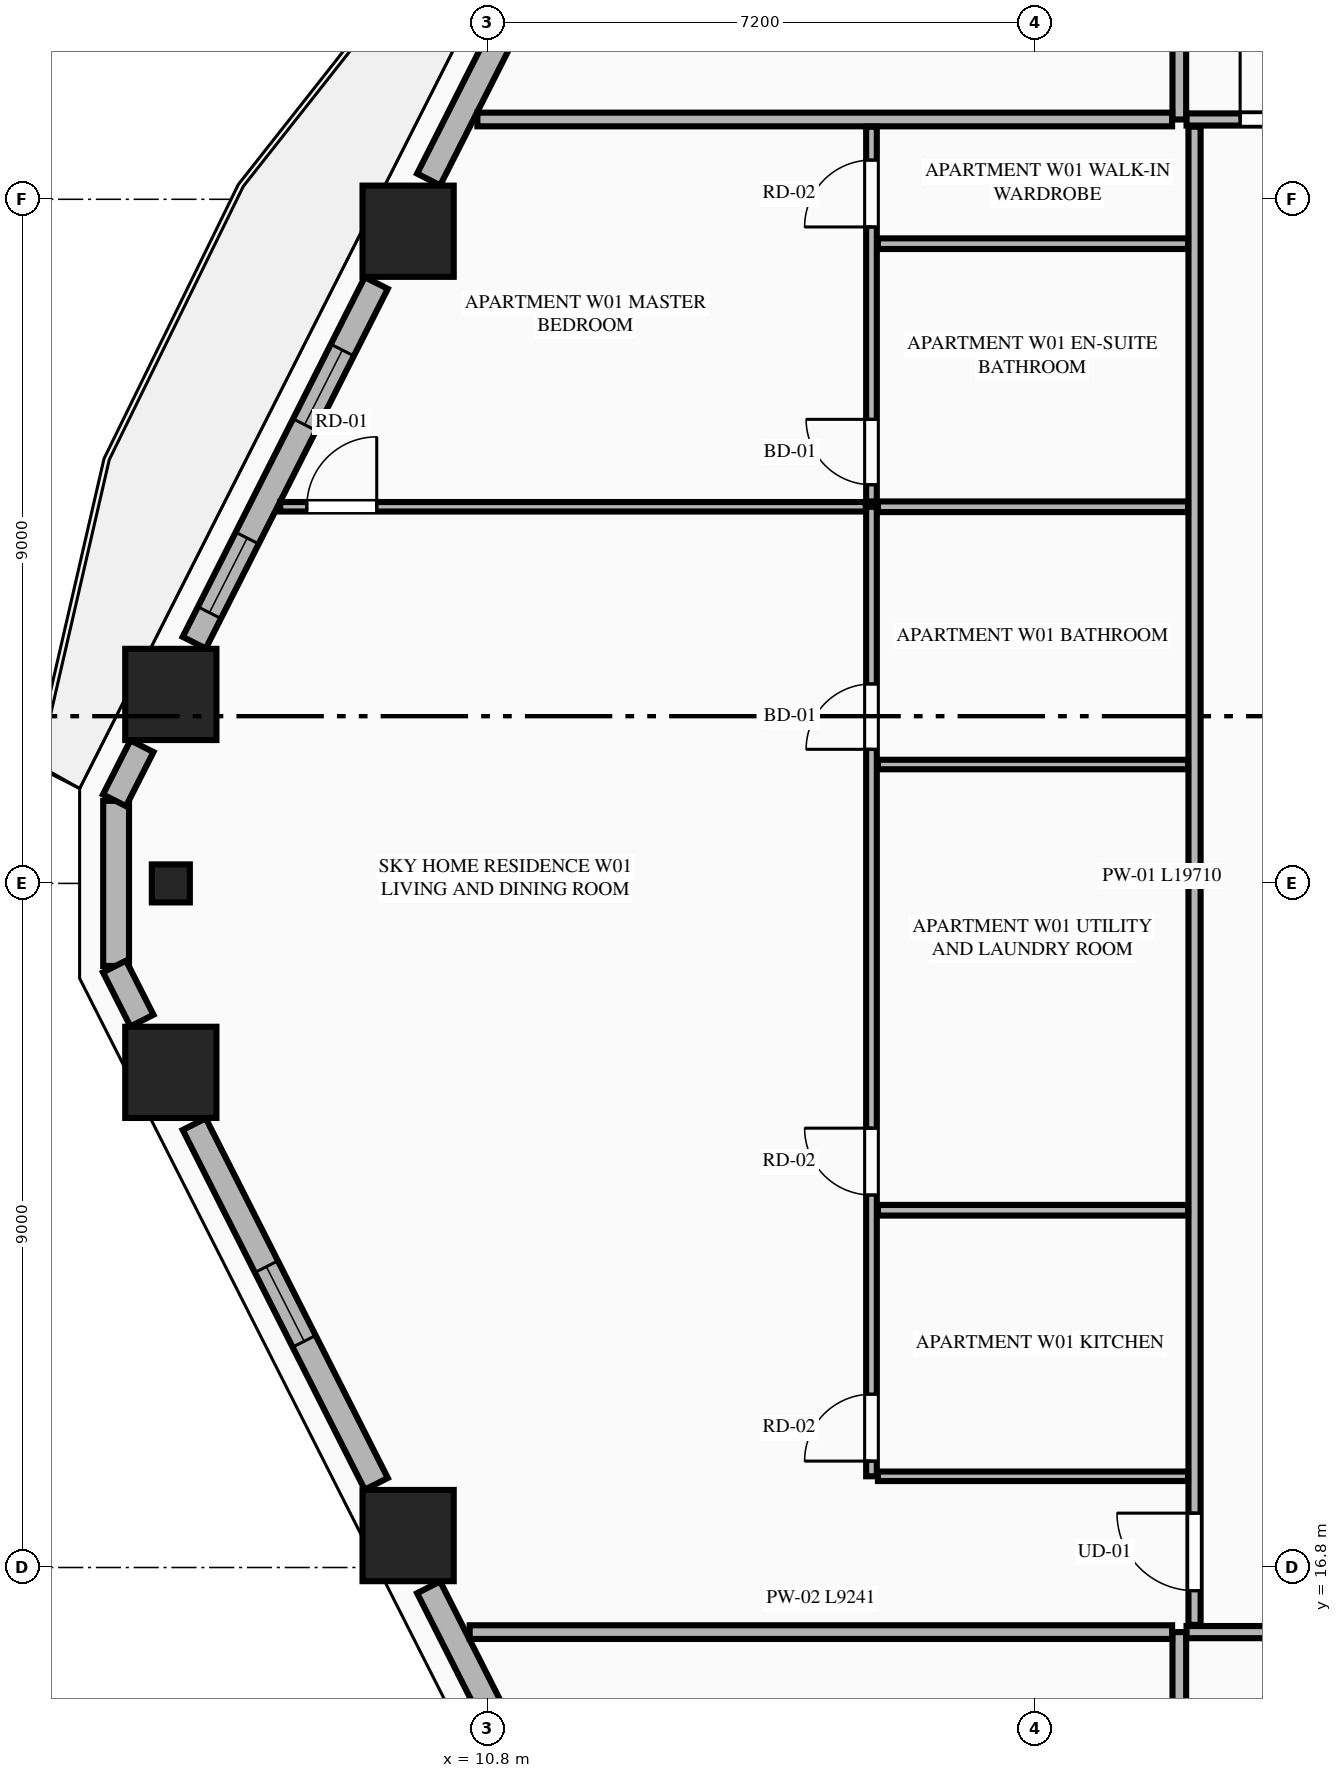
"""IFC4 building model, lengths in metres.
Left out: names, types, materials, properties, quantities, classifications, styles, units other than length and angle.
Written with IfcOpenShell. Run it as: python <this file> out.ifc"""

import sys

from ifc_helpers import new_model, si_unit, direction, frame, frame_2d, origin, origin_2d, place, context, subcontext, project, spatial, rectangle, extrude, element, fill, save


model = new_model("IFC4")
c1 = context("Model", 3, precision=1e-05, world=origin(), true_north=direction((0.0, 1.0)))
c2 = subcontext(c1, "Body", "Model", "MODEL_VIEW")
j1 = project(units=[si_unit("LENGTHUNIT", "METRE"), si_unit("PLANEANGLEUNIT", "RADIAN")], contexts=[c1])
p1 = place(None, origin())
s1 = spatial("IfcSite", under=j1, at=p1, CompositionType="ELEMENT")
p2 = place(p1, origin())
s2 = spatial("IfcBuilding", under=s1, at=p2, CompositionType="ELEMENT")
p3 = place(p2, frame((0.0, 0.0, 49.75)))
s3 = spatial("IfcBuildingStorey", under=s2, at=p3, CompositionType="ELEMENT", Elevation=49.75)
for number, where, z_axis, x_axis in (
    (1, (9.754, 34.38, 0.0), (0.0, 0.0, 1.0), (1.0, 0.0, 0.0)),
    (2, (6.632, 28.286, 0.0), (0.0, 0.0, 1.0), (1.0, 0.0, 0.0)),
    (3, (6.632, 23.314, 0.0), (0.0, 0.0, 1.0), (1.0, 0.0, 0.0)),
    (4, (9.754, 17.22, 0.0), (0.0, 0.0, 1.0), (1.0, 0.0, 0.0)),
):
    element("IfcColumn", number, at=place(p3, frame(where, z_axis=z_axis, x_axis=x_axis)), inside=s3, PredefinedType="COLUMN", context=c2, shape_type="SweptSolid", body=[
        extrude(rectangle(XDim=1.2, YDim=1.2, at=origin_2d()), origin(), (0.0, 0.0, 1.0), 3.55),
    ])
p4 = place(p3, frame((6.632, 25.8, 0.0), z_axis=(0.0, 0.0, 1.0), x_axis=(0.0, -1.0, 0.0)))
e5 = element("IfcColumn", 5, at=p4, inside=s3, PredefinedType="PILASTER", context=c2, shape_type="SweptSolid", body=[
    extrude(rectangle(XDim=0.5, YDim=0.35, at=origin_2d()), origin(), (0.0, 0.0, 1.0), 3.55),
])
p5 = place(p3, frame((5.912, 26.886, 0.0), z_axis=(0.0, 0.0, 1.0), x_axis=(0.0, -1.0, 0.0)))
e6 = element("IfcWall", 6, at=p5, inside=s3, PredefinedType="STANDARD", context=c2, shape_type="SweptSolid", body=[
    extrude(rectangle(XDim=2.172, YDim=0.34, at=frame_2d((1.086, 0.0))), origin(), (0.0, 0.0, 1.0), 3.33),
])
p6 = place(p3, frame((12.529, 40.01, 0.0), z_axis=(0.0, 0.0, 1.0), x_axis=(-0.451627137896, -0.892206774417, 0.0)))
e7 = element("IfcWall", 7, at=p6, inside=s3, PredefinedType="STANDARD", context=c2, shape_type="SweptSolid", body=[
    extrude(rectangle(XDim=5.547, YDim=0.34, at=frame_2d((2.773, 0.0))), origin(), (0.0, 0.0, 1.0), 2.787),
])
p7 = place(p6, frame((1.656, 0.0, 0.0)))
e8 = element("IfcOpeningElement", 8, at=p7, cuts=e7, PredefinedType="OPENING", context=c2, shape_type="SweptSolid", body=[
    extrude(rectangle(XDim=1.1, YDim=2.25, at=frame_2d((0.55, 1.125))), frame((0.0, 0.18, 0.0), z_axis=(0.0, -1.0, 0.0), x_axis=(1.0, 0.0, 0.0)), (0.0, 0.0, 1.0), 0.36),
])
p8 = place(p3, frame((9.335, 33.699, 0.0), z_axis=(0.0, 0.0, 1.0), x_axis=(-0.451590635984, -0.892225250422, 0.0)))
e9 = element("IfcWall", 9, at=p8, inside=s3, PredefinedType="STANDARD", context=c2, shape_type="SweptSolid", body=[
    extrude(rectangle(XDim=5.303, YDim=0.34, at=frame_2d((2.652, 0.0))), origin(), (0.0, 0.0, 1.0), 2.787),
])
p9 = place(p8, frame((0.989, 0.0, 0.75)))
e10 = element("IfcOpeningElement", 10, at=p9, cuts=e9, PredefinedType="OPENING", context=c2, shape_type="SweptSolid", body=[
    extrude(rectangle(XDim=1.1, YDim=1.887, at=frame_2d((0.55, 0.943))), frame((0.0, 0.18, 0.0), z_axis=(0.0, -1.0, 0.0), x_axis=(1.0, 0.0, 0.0)), (0.0, 0.0, 1.0), 0.36),
])
p10 = place(p8, frame((3.761, 0.0, 0.75)))
e11 = element("IfcOpeningElement", 11, at=p10, cuts=e9, PredefinedType="OPENING", context=c2, shape_type="SweptSolid", body=[
    extrude(rectangle(XDim=1.1, YDim=1.887, at=frame_2d((0.55, 0.943))), frame((0.0, 0.18, 0.0), z_axis=(0.0, -1.0, 0.0), x_axis=(1.0, 0.0, 0.0)), (0.0, 0.0, 1.0), 0.36),
])
for number, where, z_axis, x_axis in (
    (12, (6.252, 27.605, 0.0), (0.0, 0.0, 1.0), (-0.452, -0.892, 0.0)),
    (13, (5.891, 24.707, 0.0), (0.0, 0.0, 1.0), (0.452, -0.892, 0.0)),
):
    element("IfcWall", number, at=place(p3, frame(where, z_axis=z_axis, x_axis=x_axis)), inside=s3, PredefinedType="STANDARD", context=c2, shape_type="SweptSolid", body=[
        extrude(rectangle(XDim=0.798, YDim=0.34, at=frame_2d((0.399, 0.0))), origin(), (0.0, 0.0, 1.0), 3.33),
    ])
p11 = place(p3, frame((6.94, 22.633, 0.0), z_axis=(0.0, 0.0, 1.0), x_axis=(0.451572088722, -0.892234637686, 0.0)))
e14 = element("IfcWall", 14, at=p11, inside=s3, PredefinedType="STANDARD", context=c2, shape_type="SweptSolid", body=[
    extrude(rectangle(XDim=5.304, YDim=0.34, at=frame_2d((2.652, 0.0))), origin(), (0.0, 0.0, 1.0), 2.787),
])
p12 = place(p11, frame((2.102, 0.0, 0.75)))
e15 = element("IfcOpeningElement", 15, at=p12, cuts=e14, PredefinedType="OPENING", context=c2, shape_type="SweptSolid", body=[
    extrude(rectangle(XDim=1.1, YDim=1.887, at=frame_2d((0.55, 0.943))), frame((0.0, 0.18, 0.0), z_axis=(0.0, -1.0, 0.0), x_axis=(1.0, 0.0, 0.0)), (0.0, 0.0, 1.0), 0.36),
])
p13 = place(p3, frame((10.024, 16.539, 0.0), z_axis=(0.0, 0.0, 1.0), x_axis=(0.451627137896, -0.892206774417, 0.0)))
e16 = element("IfcWall", 16, at=p13, inside=s3, PredefinedType="STANDARD", context=c2, shape_type="SweptSolid", body=[
    extrude(rectangle(XDim=5.547, YDim=0.34, at=frame_2d((2.773, 0.0))), origin(), (0.0, 0.0, 1.0), 2.787),
])
p14 = place(p13, frame((2.223, 0.0, 0.75)))
e17 = element("IfcOpeningElement", 17, at=p14, cuts=e16, PredefinedType="OPENING", context=c2, shape_type="SweptSolid", body=[
    extrude(rectangle(XDim=1.1, YDim=1.887, at=frame_2d((0.55, 0.943))), frame((0.0, 0.18, 0.0), z_axis=(0.0, -1.0, 0.0), x_axis=(1.0, 0.0, 0.0)), (0.0, 0.0, 1.0), 0.36),
])
p15 = place(p3, frame((19.9, 2.455, 0.0), z_axis=(0.0, 0.0, 1.0), x_axis=(0.0, 1.0, 0.0)))
e18 = element("IfcWall", 18, at=p15, inside=s3, PredefinedType="PARTITIONING", context=c2, shape_type="SweptSolid", body=[
    extrude(rectangle(XDim=13.495, YDim=0.18, at=frame_2d((6.748, 0.0))), origin(), (0.0, 0.0, 1.0), 3.33),
])
p16 = place(p3, frame((19.995, 15.95, 0.0), z_axis=(0.0, 0.0, 1.0), x_axis=(1.0, 0.0, 0.0)))
e19 = element("IfcWall", 19, at=p16, inside=s3, PredefinedType="PARTITIONING", context=c2, shape_type="SweptSolid", body=[
    extrude(rectangle(XDim=24.81, YDim=0.16, at=frame_2d((12.405, 0.0))), origin(), (0.0, 0.0, 1.0), 3.33),
])
p17 = place(p16, frame((22.605, 0.0, 0.0)))
e20 = element("IfcOpeningElement", 20, at=p17, cuts=e19, PredefinedType="OPENING", context=c2, shape_type="SweptSolid", body=[
    extrude(rectangle(XDim=1.02, YDim=2.25, at=frame_2d((0.51, 1.125))), frame((0.0, 0.09, 0.0), z_axis=(0.0, -1.0, 0.0), x_axis=(1.0, 0.0, 0.0)), (0.0, 0.0, 1.0), 0.18),
])
p18 = place(p3, frame((19.9, 35.85, 0.0), z_axis=(0.0, 0.0, 1.0), x_axis=(0.0, 1.0, 0.0)))
e21 = element("IfcWall", 21, at=p18, inside=s3, PredefinedType="PARTITIONING", context=c2, shape_type="SweptSolid", body=[
    extrude(rectangle(XDim=13.295, YDim=0.18, at=frame_2d((6.647, 0.0))), origin(), (0.0, 0.0, 1.0), 3.33),
])
p19 = place(p3, frame((19.995, 35.85, 0.0), z_axis=(0.0, 0.0, 1.0), x_axis=(1.0, 0.0, 0.0)))
e22 = element("IfcWall", 22, at=p19, inside=s3, PredefinedType="PARTITIONING", context=c2, shape_type="SweptSolid", body=[
    extrude(rectangle(XDim=8.188, YDim=0.16, at=frame_2d((4.094, 0.0))), origin(), (0.0, 0.0, 1.0), 3.33),
])
p20 = place(p19, frame((0.705, 0.0, 0.0)))
e23 = element("IfcOpeningElement", 23, at=p20, cuts=e22, PredefinedType="OPENING", context=c2, shape_type="SweptSolid", body=[
    extrude(rectangle(XDim=1.02, YDim=2.25, at=frame_2d((0.51, 1.125))), frame((0.0, 0.09, 0.0), z_axis=(0.0, -1.0, 0.0), x_axis=(1.0, 0.0, 0.0)), (0.0, 0.0, 1.0), 0.18),
])
p21 = place(p3, frame((10.564, 15.95, 0.0), z_axis=(0.0, 0.0, 1.0), x_axis=(1.0, 0.0, 0.0)))
e24 = element("IfcWall", 24, at=p21, inside=s3, PredefinedType="PARTITIONING", context=c2, shape_type="SweptSolid", body=[
    extrude(rectangle(XDim=9.241, YDim=0.18, at=frame_2d((4.621, 0.0))), origin(), (0.0, 0.0, 1.0), 3.33),
])
p22 = place(p3, frame((10.665, 35.85, 0.0), z_axis=(0.0, 0.0, 1.0), x_axis=(1.0, 0.0, 0.0)))
e25 = element("IfcWall", 25, at=p22, inside=s3, PredefinedType="PARTITIONING", context=c2, shape_type="SweptSolid", body=[
    extrude(rectangle(XDim=9.14, YDim=0.18, at=frame_2d((4.57, 0.0))), origin(), (0.0, 0.0, 1.0), 3.33),
])
p23 = place(p3, frame((20.1, 16.045, 0.0), z_axis=(0.0, 0.0, 1.0), x_axis=(0.0, 1.0, 0.0)))
e26 = element("IfcWall", 26, at=p23, inside=s3, PredefinedType="PARTITIONING", context=c2, shape_type="SweptSolid", body=[
    extrude(rectangle(XDim=19.71, YDim=0.16, at=frame_2d((9.855, 0.0))), origin(), (0.0, 0.0, 1.0), 2.7),
])
p24 = place(p23, frame((0.45, 0.0, 0.0)))
e27 = element("IfcOpeningElement", 27, at=p24, cuts=e26, PredefinedType="OPENING", context=c2, shape_type="SweptSolid", body=[
    extrude(rectangle(XDim=1.02, YDim=2.25, at=frame_2d((0.51, 1.125))), frame((0.0, 0.09, 0.0), z_axis=(0.0, -1.0, 0.0), x_axis=(1.0, 0.0, 0.0)), (0.0, 0.0, 1.0), 0.18),
])
p25 = place(p3, frame((15.935, 18.0, 0.0), z_axis=(0.0, 0.0, 1.0), x_axis=(1.0, 0.0, 0.0)))
e28 = element("IfcWall", 28, at=p25, inside=s3, PredefinedType="PARTITIONING", context=c2, shape_type="SweptSolid", body=[
    extrude(rectangle(XDim=4.08, YDim=0.125, at=frame_2d((2.04, 0.0))), origin(), (0.0, 0.0, 1.0), 2.7),
])
p26 = place(p3, frame((15.85, 18.0, 0.0), z_axis=(0.0, 0.0, 1.0), x_axis=(0.0, 1.0, 0.0)))
e29 = element("IfcWall", 29, at=p26, inside=s3, PredefinedType="PLUMBINGWALL", context=c2, shape_type="SweptSolid", body=[
    extrude(rectangle(XDim=12.755, YDim=0.14, at=frame_2d((6.377, 0.0))), origin(), (0.0, 0.0, 1.0), 3.33),
])
p27 = place(p26, frame((0.2, 0.0, 0.0)))
e30 = element("IfcOpeningElement", 30, at=p27, cuts=e29, PredefinedType="OPENING", context=c2, shape_type="SweptSolid", body=[
    extrude(rectangle(XDim=0.88, YDim=2.15, at=frame_2d((0.44, 1.075))), frame((0.0, 0.08, 0.0), z_axis=(0.0, -1.0, 0.0), x_axis=(1.0, 0.0, 0.0)), (0.0, 0.0, 1.0), 0.16),
])
p28 = place(p26, frame((3.7, 0.0, 0.0)))
e31 = element("IfcOpeningElement", 31, at=p28, cuts=e29, PredefinedType="OPENING", context=c2, shape_type="SweptSolid", body=[
    extrude(rectangle(XDim=0.88, YDim=2.15, at=frame_2d((0.44, 1.075))), frame((0.0, 0.08, 0.0), z_axis=(0.0, -1.0, 0.0), x_axis=(1.0, 0.0, 0.0)), (0.0, 0.0, 1.0), 0.16),
])
p29 = place(p26, frame((9.564, 0.0, 0.0)))
e32 = element("IfcOpeningElement", 32, at=p29, cuts=e29, PredefinedType="OPENING", context=c2, shape_type="SweptSolid", body=[
    extrude(rectangle(XDim=0.86, YDim=2.1, at=frame_2d((0.43, 1.05))), frame((0.0, 0.08, 0.0), z_axis=(0.0, -1.0, 0.0), x_axis=(1.0, 0.0, 0.0)), (0.0, 0.0, 1.0), 0.16),
])
p30 = place(p3, frame((15.85, 30.825, 0.0), z_axis=(0.0, 0.0, 1.0), x_axis=(0.0, 1.0, 0.0)))
e33 = element("IfcWall", 33, at=p30, inside=s3, PredefinedType="PLUMBINGWALL", context=c2, shape_type="SweptSolid", body=[
    extrude(rectangle(XDim=4.93, YDim=0.14, at=frame_2d((2.465, 0.0))), origin(), (0.0, 0.0, 1.0), 3.33),
])
p31 = place(p30, frame((0.22, 0.0, 0.0)))
e34 = element("IfcOpeningElement", 34, at=p31, cuts=e33, PredefinedType="OPENING", context=c2, shape_type="SweptSolid", body=[
    extrude(rectangle(XDim=0.86, YDim=2.1, at=frame_2d((0.43, 1.05))), frame((0.0, 0.08, 0.0), z_axis=(0.0, -1.0, 0.0), x_axis=(1.0, 0.0, 0.0)), (0.0, 0.0, 1.0), 0.16),
])
p32 = place(p30, frame((3.611, 0.0, 0.0)))
e35 = element("IfcOpeningElement", 35, at=p32, cuts=e33, PredefinedType="OPENING", context=c2, shape_type="SweptSolid", body=[
    extrude(rectangle(XDim=0.88, YDim=2.15, at=frame_2d((0.44, 1.075))), frame((0.0, 0.08, 0.0), z_axis=(0.0, -1.0, 0.0), x_axis=(1.0, 0.0, 0.0)), (0.0, 0.0, 1.0), 0.16),
])
p33 = place(p3, frame((15.935, 30.755, 0.0), z_axis=(0.0, 0.0, 1.0), x_axis=(1.0, 0.0, 0.0)))
e36 = element("IfcWall", 36, at=p33, inside=s3, PredefinedType="PLUMBINGWALL", context=c2, shape_type="SweptSolid", body=[
    extrude(rectangle(XDim=4.08, YDim=0.14, at=frame_2d((2.04, 0.0))), origin(), (0.0, 0.0, 1.0), 3.33),
])
p34 = place(p3, frame((8.071, 30.755, 0.0), z_axis=(0.0, 0.0, 1.0), x_axis=(1.0, 0.0, 0.0)))
e37 = element("IfcWall", 37, at=p34, inside=s3, PredefinedType="PARTITIONING", context=c2, shape_type="SweptSolid", body=[
    extrude(rectangle(XDim=7.704, YDim=0.125, at=frame_2d((3.852, 0.0))), origin(), (0.0, 0.0, 1.0), 3.33),
])
p35 = place(p34, frame((0.35, 0.0, 0.0)))
e38 = element("IfcOpeningElement", 38, at=p35, cuts=e37, PredefinedType="OPENING", context=c2, shape_type="SweptSolid", body=[
    extrude(rectangle(XDim=0.92, YDim=2.15, at=frame_2d((0.46, 1.075))), frame((0.0, 0.073, 0.0), z_axis=(0.0, -1.0, 0.0), x_axis=(1.0, 0.0, 0.0)), (0.0, 0.0, 1.0), 0.145),
])
p36 = place(p3, frame((15.935, 21.5, 0.0), z_axis=(0.0, 0.0, 1.0), x_axis=(1.0, 0.0, 0.0)))
e39 = element("IfcWall", 39, at=p36, inside=s3, PredefinedType="PLUMBINGWALL", context=c2, shape_type="SweptSolid", body=[
    extrude(rectangle(XDim=4.08, YDim=0.14, at=frame_2d((2.04, 0.0))), origin(), (0.0, 0.0, 1.0), 3.33),
])
p37 = place(p3, frame((15.935, 27.364, 0.0), z_axis=(0.0, 0.0, 1.0), x_axis=(1.0, 0.0, 0.0)))
e40 = element("IfcWall", 40, at=p37, inside=s3, PredefinedType="PARTITIONING", context=c2, shape_type="SweptSolid", body=[
    extrude(rectangle(XDim=4.08, YDim=0.125, at=frame_2d((2.04, 0.0))), origin(), (0.0, 0.0, 1.0), 3.33),
])
p38 = place(p3, frame((15.935, 34.216, 0.0), z_axis=(0.0, 0.0, 1.0), x_axis=(1.0, 0.0, 0.0)))
e41 = element("IfcWall", 41, at=p38, inside=s3, PredefinedType="PLUMBINGWALL", context=c2, shape_type="SweptSolid", body=[
    extrude(rectangle(XDim=4.08, YDim=0.14, at=frame_2d((2.04, 0.0))), origin(), (0.0, 0.0, 1.0), 2.7),
])
p39 = place(p9, origin())
e42 = element("IfcWindow", 42, at=p39, inside=s3, PartitioningType="SINGLE_PANEL", PredefinedType="WINDOW", context=c2, shape_type="SweptSolid", body=[
    extrude(rectangle(XDim=1.1, YDim=1.887, at=frame_2d((0.55, 0.943))), frame((0.0, 0.03, 0.0), z_axis=(0.0, -1.0, 0.0), x_axis=(1.0, 0.0, 0.0)), (0.0, 0.0, 1.0), 0.06),
])
fill(e10, e42)
p40 = place(p12, origin())
e43 = element("IfcWindow", 43, at=p40, inside=s3, PartitioningType="SINGLE_PANEL", PredefinedType="WINDOW", context=c2, shape_type="SweptSolid", body=[
    extrude(rectangle(XDim=1.1, YDim=1.887, at=frame_2d((0.55, 0.943))), frame((0.0, 0.03, 0.0), z_axis=(0.0, -1.0, 0.0), x_axis=(1.0, 0.0, 0.0)), (0.0, 0.0, 1.0), 0.06),
])
fill(e15, e43)
p41 = place(p20, origin())
e44 = element("IfcDoor", 44, at=p41, inside=s3, OperationType="SINGLE_SWING_LEFT", PredefinedType="DOOR", context=c2, shape_type="SweptSolid", body=[
    extrude(rectangle(XDim=1.02, YDim=2.25, at=frame_2d((0.51, 1.125))), frame((0.0, 0.025, 0.0), z_axis=(0.0, -1.0, 0.0), x_axis=(1.0, 0.0, 0.0)), (0.0, 0.0, 1.0), 0.05),
])
fill(e23, e44)
p42 = place(p27, origin())
e45 = element("IfcDoor", 45, at=p42, inside=s3, OperationType="SINGLE_SWING_LEFT", PredefinedType="DOOR", context=c2, shape_type="SweptSolid", body=[
    extrude(rectangle(XDim=0.88, YDim=2.15, at=frame_2d((0.44, 1.075))), frame((0.0, 0.025, 0.0), z_axis=(0.0, -1.0, 0.0), x_axis=(1.0, 0.0, 0.0)), (0.0, 0.0, 1.0), 0.05),
])
fill(e30, e45)
p43 = place(p28, origin())
e46 = element("IfcDoor", 46, at=p43, inside=s3, OperationType="SINGLE_SWING_RIGHT", PredefinedType="DOOR", context=c2, shape_type="SweptSolid", body=[
    extrude(rectangle(XDim=0.88, YDim=2.15, at=frame_2d((0.44, 1.075))), frame((0.0, 0.025, 0.0), z_axis=(0.0, -1.0, 0.0), x_axis=(1.0, 0.0, 0.0)), (0.0, 0.0, 1.0), 0.05),
])
fill(e31, e46)
p44 = place(p29, origin())
e47 = element("IfcDoor", 47, at=p44, inside=s3, OperationType="SINGLE_SWING_LEFT", PredefinedType="DOOR", context=c2, shape_type="SweptSolid", body=[
    extrude(rectangle(XDim=0.86, YDim=2.1, at=frame_2d((0.43, 1.05))), frame((0.0, 0.025, 0.0), z_axis=(0.0, -1.0, 0.0), x_axis=(1.0, 0.0, 0.0)), (0.0, 0.0, 1.0), 0.05),
])
fill(e32, e47)
p45 = place(p31, origin())
e48 = element("IfcDoor", 48, at=p45, inside=s3, OperationType="SINGLE_SWING_RIGHT", PredefinedType="DOOR", context=c2, shape_type="SweptSolid", body=[
    extrude(rectangle(XDim=0.86, YDim=2.1, at=frame_2d((0.43, 1.05))), frame((0.0, 0.025, 0.0), z_axis=(0.0, -1.0, 0.0), x_axis=(1.0, 0.0, 0.0)), (0.0, 0.0, 1.0), 0.05),
])
fill(e34, e48)
p46 = place(p32, origin())
e49 = element("IfcDoor", 49, at=p46, inside=s3, OperationType="SINGLE_SWING_LEFT", PredefinedType="DOOR", context=c2, shape_type="SweptSolid", body=[
    extrude(rectangle(XDim=0.88, YDim=2.15, at=frame_2d((0.44, 1.075))), frame((0.0, 0.025, 0.0), z_axis=(0.0, -1.0, 0.0), x_axis=(1.0, 0.0, 0.0)), (0.0, 0.0, 1.0), 0.05),
])
fill(e35, e49)
p47 = place(p24, origin())
e50 = element("IfcDoor", 50, at=p47, inside=s3, OperationType="SINGLE_SWING_RIGHT", PredefinedType="DOOR", context=c2, shape_type="SweptSolid", body=[
    extrude(rectangle(XDim=1.02, YDim=2.25, at=frame_2d((0.51, 1.125))), frame((0.0, 0.025, 0.0), z_axis=(0.0, -1.0, 0.0), x_axis=(1.0, 0.0, 0.0)), (0.0, 0.0, 1.0), 0.05),
])
fill(e27, e50)
p48 = place(p35, origin())
e51 = element("IfcDoor", 51, at=p48, inside=s3, OperationType="SINGLE_SWING_RIGHT", PredefinedType="DOOR", context=c2, shape_type="SweptSolid", body=[
    extrude(rectangle(XDim=0.92, YDim=2.15, at=frame_2d((0.46, 1.075))), frame((0.0, 0.025, 0.0), z_axis=(0.0, -1.0, 0.0), x_axis=(1.0, 0.0, 0.0)), (0.0, 0.0, 1.0), 0.05),
])
fill(e38, e51)
p49 = place(p10, origin())
e52 = element("IfcWindow", 52, at=p49, inside=s3, PartitioningType="SINGLE_PANEL", PredefinedType="WINDOW", context=c2, shape_type="SweptSolid", body=[
    extrude(rectangle(XDim=1.1, YDim=1.887, at=frame_2d((0.55, 0.943))), frame((0.0, 0.03, 0.0), z_axis=(0.0, -1.0, 0.0), x_axis=(1.0, 0.0, 0.0)), (0.0, 0.0, 1.0), 0.06),
])
fill(e11, e52)
save(model, sys.argv[1])
